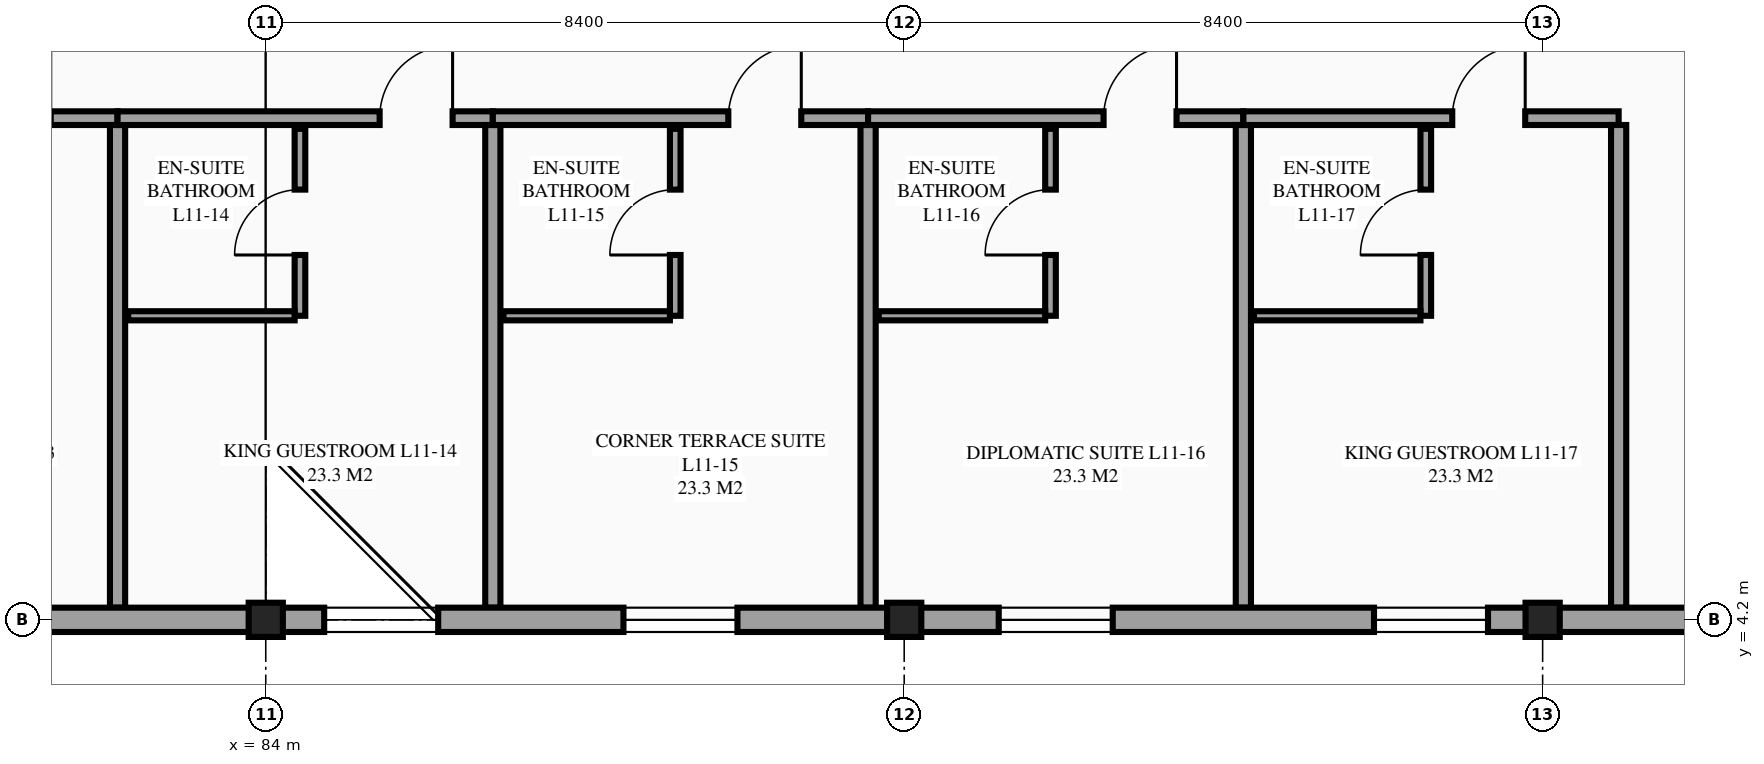
"""IFC4 building model, lengths in metres.
Left out: names, types, materials, properties, quantities, classifications, styles, units other than length and angle.
Written with IfcOpenShell. Run it as: python <this file> out.ifc"""

import sys

from ifc_helpers import new_model, si_unit, direction, frame, frame_2d, origin, origin_2d, place, context, subcontext, project, spatial, rectangle, extrude, element, fill, save


model = new_model("IFC4")
c1 = context("Model", 3, precision=1e-05, world=origin(), true_north=direction((0.0, 1.0)))
c2 = subcontext(c1, "Body", "Model", "MODEL_VIEW")
j1 = project(units=[si_unit("LENGTHUNIT", "METRE"), si_unit("PLANEANGLEUNIT", "RADIAN")], contexts=[c1])
p1 = place(None, origin())
s1 = spatial("IfcSite", under=j1, at=p1, CompositionType="ELEMENT")
p2 = place(p1, origin())
s2 = spatial("IfcBuilding", under=s1, at=p2, CompositionType="ELEMENT")
p3 = place(p2, frame((0.0, 0.0, 43.5)))
s3 = spatial("IfcBuildingStorey", under=s2, at=p3, CompositionType="ELEMENT", Elevation=43.5)
for number, where, z_axis, x_axis in (
    (1, (84.0, 4.2, 0.0), (0.0, 0.0, 1.0), (1.0, 0.0, 0.0)),
    (2, (92.4, 4.2, 0.0), (0.0, 0.0, 1.0), (1.0, 0.0, 0.0)),
    (3, (100.8, 4.2, 0.0), (0.0, 0.0, 1.0), (1.0, 0.0, 0.0)),
):
    element("IfcColumn", number, at=place(p3, frame(where, z_axis=z_axis, x_axis=x_axis)), inside=s3, PredefinedType="COLUMN", context=c2, shape_type="SweptSolid", body=[
        extrude(rectangle(XDim=0.45, YDim=0.45, at=origin_2d()), origin(), (0.0, 0.0, 1.0), 3.6),
    ])
p4 = place(p3, frame((77.113, 10.8, 0.0), z_axis=(0.0, 0.0, 1.0), x_axis=(1.0, 0.0, 0.0)))
e4 = element("IfcWall", 4, at=p4, inside=s3, PredefinedType="PARTITIONING", context=c2, shape_type="SweptSolid", body=[
    extrude(rectangle(XDim=4.938, YDim=0.18, at=frame_2d((2.469, 0.0))), origin(), (0.0, 0.0, 1.0), 3.355),
])
p5 = place(p4, frame((3.098, 0.0, 0.0)))
e5 = element("IfcOpeningElement", 5, at=p5, cuts=e4, PredefinedType="OPENING", context=c2, shape_type="SweptSolid", body=[
    extrude(rectangle(XDim=0.96, YDim=2.15, at=frame_2d((0.48, 1.075))), frame((0.0, 0.1, 0.0), z_axis=(0.0, -1.0, 0.0), x_axis=(1.0, 0.0, 0.0)), (0.0, 0.0, 1.0), 0.2),
])
p6 = place(p3, frame((82.05, 4.36, 0.0), z_axis=(0.0, 0.0, 1.0), x_axis=(0.0, 1.0, 0.0)))
e6 = element("IfcWall", 6, at=p6, inside=s3, PredefinedType="PARTITIONING", context=c2, shape_type="SweptSolid", body=[
    extrude(rectangle(XDim=6.35, YDim=0.2, at=frame_2d((3.175, 0.0))), origin(), (0.0, 0.0, 1.0), 3.355),
])
p7 = place(p3, frame((82.05, 10.8, 0.0), z_axis=(0.0, 0.0, 1.0), x_axis=(1.0, 0.0, 0.0)))
e7 = element("IfcWall", 7, at=p7, inside=s3, PredefinedType="PARTITIONING", context=c2, shape_type="SweptSolid", body=[
    extrude(rectangle(XDim=4.938, YDim=0.18, at=frame_2d((2.469, 0.0))), origin(), (0.0, 0.0, 1.0), 3.355),
])
p8 = place(p7, frame((3.448, 0.0, 0.0)))
e8 = element("IfcOpeningElement", 8, at=p8, cuts=e7, PredefinedType="OPENING", context=c2, shape_type="SweptSolid", body=[
    extrude(rectangle(XDim=0.96, YDim=2.15, at=frame_2d((0.48, 1.075))), frame((0.0, 0.1, 0.0), z_axis=(0.0, -1.0, 0.0), x_axis=(1.0, 0.0, 0.0)), (0.0, 0.0, 1.0), 0.2),
])
p9 = place(p3, frame((86.988, 4.36, 0.0), z_axis=(0.0, 0.0, 1.0), x_axis=(0.0, 1.0, 0.0)))
e9 = element("IfcWall", 9, at=p9, inside=s3, PredefinedType="PARTITIONING", context=c2, shape_type="SweptSolid", body=[
    extrude(rectangle(XDim=6.35, YDim=0.2, at=frame_2d((3.175, 0.0))), origin(), (0.0, 0.0, 1.0), 3.355),
])
p10 = place(p3, frame((84.45, 8.2, 0.0), z_axis=(0.0, 0.0, 1.0), x_axis=(0.0, 1.0, 0.0)))
e10 = element("IfcWall", 10, at=p10, inside=s3, PredefinedType="PARTITIONING", context=c2, shape_type="SweptSolid", body=[
    extrude(rectangle(XDim=2.46, YDim=0.14, at=frame_2d((1.23, 0.0))), origin(), (0.0, 0.0, 1.0), 3.355),
])
p11 = place(p10, frame((0.8, 0.0, 0.0)))
e11 = element("IfcOpeningElement", 11, at=p11, cuts=e10, PredefinedType="OPENING", context=c2, shape_type="SweptSolid", body=[
    extrude(rectangle(XDim=0.86, YDim=2.1, at=frame_2d((0.43, 1.05))), frame((0.0, 0.08, 0.0), z_axis=(0.0, -1.0, 0.0), x_axis=(1.0, 0.0, 0.0)), (0.0, 0.0, 1.0), 0.16),
])
p12 = place(p3, frame((82.19, 8.2, 0.0), z_axis=(0.0, 0.0, 1.0), x_axis=(1.0, 0.0, 0.0)))
e12 = element("IfcWall", 12, at=p12, inside=s3, PredefinedType="PARTITIONING", context=c2, shape_type="SweptSolid", body=[
    extrude(rectangle(XDim=2.19, YDim=0.12, at=frame_2d((1.095, 0.0))), origin(), (0.0, 0.0, 1.0), 3.355),
])
p13 = place(p3, frame((86.988, 10.8, 0.0), z_axis=(0.0, 0.0, 1.0), x_axis=(1.0, 0.0, 0.0)))
e13 = element("IfcWall", 13, at=p13, inside=s3, PredefinedType="PARTITIONING", context=c2, shape_type="SweptSolid", body=[
    extrude(rectangle(XDim=4.938, YDim=0.18, at=frame_2d((2.469, 0.0))), origin(), (0.0, 0.0, 1.0), 3.355),
])
p14 = place(p13, frame((3.098, 0.0, 0.0)))
e14 = element("IfcOpeningElement", 14, at=p14, cuts=e13, PredefinedType="OPENING", context=c2, shape_type="SweptSolid", body=[
    extrude(rectangle(XDim=0.96, YDim=2.15, at=frame_2d((0.48, 1.075))), frame((0.0, 0.1, 0.0), z_axis=(0.0, -1.0, 0.0), x_axis=(1.0, 0.0, 0.0)), (0.0, 0.0, 1.0), 0.2),
])
p15 = place(p3, frame((91.925, 4.36, 0.0), z_axis=(0.0, 0.0, 1.0), x_axis=(0.0, 1.0, 0.0)))
e15 = element("IfcWall", 15, at=p15, inside=s3, PredefinedType="PARTITIONING", context=c2, shape_type="SweptSolid", body=[
    extrude(rectangle(XDim=6.35, YDim=0.2, at=frame_2d((3.175, 0.0))), origin(), (0.0, 0.0, 1.0), 3.355),
])
p16 = place(p3, frame((89.387, 8.2, 0.0), z_axis=(0.0, 0.0, 1.0), x_axis=(0.0, 1.0, 0.0)))
e16 = element("IfcWall", 16, at=p16, inside=s3, PredefinedType="PARTITIONING", context=c2, shape_type="SweptSolid", body=[
    extrude(rectangle(XDim=2.46, YDim=0.14, at=frame_2d((1.23, 0.0))), origin(), (0.0, 0.0, 1.0), 3.355),
])
p17 = place(p16, frame((0.8, 0.0, 0.0)))
e17 = element("IfcOpeningElement", 17, at=p17, cuts=e16, PredefinedType="OPENING", context=c2, shape_type="SweptSolid", body=[
    extrude(rectangle(XDim=0.86, YDim=2.1, at=frame_2d((0.43, 1.05))), frame((0.0, 0.08, 0.0), z_axis=(0.0, -1.0, 0.0), x_axis=(1.0, 0.0, 0.0)), (0.0, 0.0, 1.0), 0.16),
])
p18 = place(p3, frame((87.127, 8.2, 0.0), z_axis=(0.0, 0.0, 1.0), x_axis=(1.0, 0.0, 0.0)))
e18 = element("IfcWall", 18, at=p18, inside=s3, PredefinedType="PARTITIONING", context=c2, shape_type="SweptSolid", body=[
    extrude(rectangle(XDim=2.19, YDim=0.12, at=frame_2d((1.095, 0.0))), origin(), (0.0, 0.0, 1.0), 3.355),
])
p19 = place(p3, frame((91.925, 10.8, 0.0), z_axis=(0.0, 0.0, 1.0), x_axis=(1.0, 0.0, 0.0)))
e19 = element("IfcWall", 19, at=p19, inside=s3, PredefinedType="PARTITIONING", context=c2, shape_type="SweptSolid", body=[
    extrude(rectangle(XDim=4.938, YDim=0.18, at=frame_2d((2.469, 0.0))), origin(), (0.0, 0.0, 1.0), 3.355),
])
p20 = place(p19, frame((3.098, 0.0, 0.0)))
e20 = element("IfcOpeningElement", 20, at=p20, cuts=e19, PredefinedType="OPENING", context=c2, shape_type="SweptSolid", body=[
    extrude(rectangle(XDim=0.96, YDim=2.15, at=frame_2d((0.48, 1.075))), frame((0.0, 0.1, 0.0), z_axis=(0.0, -1.0, 0.0), x_axis=(1.0, 0.0, 0.0)), (0.0, 0.0, 1.0), 0.2),
])
p21 = place(p3, frame((96.863, 4.36, 0.0), z_axis=(0.0, 0.0, 1.0), x_axis=(0.0, 1.0, 0.0)))
e21 = element("IfcWall", 21, at=p21, inside=s3, PredefinedType="PARTITIONING", context=c2, shape_type="SweptSolid", body=[
    extrude(rectangle(XDim=6.35, YDim=0.2, at=frame_2d((3.175, 0.0))), origin(), (0.0, 0.0, 1.0), 3.355),
])
p22 = place(p3, frame((94.325, 8.2, 0.0), z_axis=(0.0, 0.0, 1.0), x_axis=(0.0, 1.0, 0.0)))
e22 = element("IfcWall", 22, at=p22, inside=s3, PredefinedType="PARTITIONING", context=c2, shape_type="SweptSolid", body=[
    extrude(rectangle(XDim=2.46, YDim=0.14, at=frame_2d((1.23, 0.0))), origin(), (0.0, 0.0, 1.0), 3.355),
])
p23 = place(p22, frame((0.8, 0.0, 0.0)))
e23 = element("IfcOpeningElement", 23, at=p23, cuts=e22, PredefinedType="OPENING", context=c2, shape_type="SweptSolid", body=[
    extrude(rectangle(XDim=0.86, YDim=2.1, at=frame_2d((0.43, 1.05))), frame((0.0, 0.08, 0.0), z_axis=(0.0, -1.0, 0.0), x_axis=(1.0, 0.0, 0.0)), (0.0, 0.0, 1.0), 0.16),
])
p24 = place(p3, frame((92.065, 8.2, 0.0), z_axis=(0.0, 0.0, 1.0), x_axis=(1.0, 0.0, 0.0)))
e24 = element("IfcWall", 24, at=p24, inside=s3, PredefinedType="PARTITIONING", context=c2, shape_type="SweptSolid", body=[
    extrude(rectangle(XDim=2.19, YDim=0.12, at=frame_2d((1.095, 0.0))), origin(), (0.0, 0.0, 1.0), 3.355),
])
p25 = place(p3, frame((96.863, 10.8, 0.0), z_axis=(0.0, 0.0, 1.0), x_axis=(1.0, 0.0, 0.0)))
e25 = element("IfcWall", 25, at=p25, inside=s3, PredefinedType="PARTITIONING", context=c2, shape_type="SweptSolid", body=[
    extrude(rectangle(XDim=4.938, YDim=0.18, at=frame_2d((2.469, 0.0))), origin(), (0.0, 0.0, 1.0), 3.355),
])
p26 = place(p25, frame((2.748, 0.0, 0.0)))
e26 = element("IfcOpeningElement", 26, at=p26, cuts=e25, PredefinedType="OPENING", context=c2, shape_type="SweptSolid", body=[
    extrude(rectangle(XDim=0.96, YDim=2.15, at=frame_2d((0.48, 1.075))), frame((0.0, 0.1, 0.0), z_axis=(0.0, -1.0, 0.0), x_axis=(1.0, 0.0, 0.0)), (0.0, 0.0, 1.0), 0.2),
])
p27 = place(p3, frame((101.8, 4.36, 0.0), z_axis=(0.0, 0.0, 1.0), x_axis=(0.0, 1.0, 0.0)))
e27 = element("IfcWall", 27, at=p27, inside=s3, PredefinedType="PARTITIONING", context=c2, shape_type="SweptSolid", body=[
    extrude(rectangle(XDim=6.35, YDim=0.2, at=frame_2d((3.175, 0.0))), origin(), (0.0, 0.0, 1.0), 3.355),
])
p28 = place(p3, frame((99.262, 8.2, 0.0), z_axis=(0.0, 0.0, 1.0), x_axis=(0.0, 1.0, 0.0)))
e28 = element("IfcWall", 28, at=p28, inside=s3, PredefinedType="PARTITIONING", context=c2, shape_type="SweptSolid", body=[
    extrude(rectangle(XDim=2.46, YDim=0.14, at=frame_2d((1.23, 0.0))), origin(), (0.0, 0.0, 1.0), 3.355),
])
p29 = place(p28, frame((0.8, 0.0, 0.0)))
e29 = element("IfcOpeningElement", 29, at=p29, cuts=e28, PredefinedType="OPENING", context=c2, shape_type="SweptSolid", body=[
    extrude(rectangle(XDim=0.86, YDim=2.1, at=frame_2d((0.43, 1.05))), frame((0.0, 0.08, 0.0), z_axis=(0.0, -1.0, 0.0), x_axis=(1.0, 0.0, 0.0)), (0.0, 0.0, 1.0), 0.16),
])
p30 = place(p3, frame((97.002, 8.2, 0.0), z_axis=(0.0, 0.0, 1.0), x_axis=(1.0, 0.0, 0.0)))
e30 = element("IfcWall", 30, at=p30, inside=s3, PredefinedType="PARTITIONING", context=c2, shape_type="SweptSolid", body=[
    extrude(rectangle(XDim=2.19, YDim=0.12, at=frame_2d((1.095, 0.0))), origin(), (0.0, 0.0, 1.0), 3.355),
])
p31 = place(p3, frame((67.2, 4.2, 0.0), z_axis=(0.0, 0.0, 1.0), x_axis=(1.0, 0.0, 0.0)))
e31 = element("IfcWall", 31, at=p31, inside=s3, PredefinedType="STANDARD", context=c2, shape_type="SweptSolid", body=[
    extrude(rectangle(XDim=16.8, YDim=0.32, at=frame_2d((8.4, 0.0))), origin(), (0.0, 0.0, 1.0), 2.61),
])
p32 = place(p31, frame((1.756, 0.0, 0.85)))
e32 = element("IfcOpeningElement", 32, at=p32, cuts=e31, PredefinedType="OPENING", context=c2, shape_type="SweptSolid", body=[
    extrude(rectangle(XDim=1.5, YDim=1.5, at=frame_2d((0.75, 0.75))), frame((0.0, 0.17, 0.0), z_axis=(0.0, -1.0, 0.0), x_axis=(1.0, 0.0, 0.0)), (0.0, 0.0, 1.0), 0.34),
])
p33 = place(p31, frame((6.194, 0.0, 0.85)))
e33 = element("IfcOpeningElement", 33, at=p33, cuts=e31, PredefinedType="OPENING", context=c2, shape_type="SweptSolid", body=[
    extrude(rectangle(XDim=1.5, YDim=1.5, at=frame_2d((0.75, 0.75))), frame((0.0, 0.17, 0.0), z_axis=(0.0, -1.0, 0.0), x_axis=(1.0, 0.0, 0.0)), (0.0, 0.0, 1.0), 0.34),
])
p34 = place(p31, frame((11.631, 0.0, 0.85)))
e34 = element("IfcOpeningElement", 34, at=p34, cuts=e31, PredefinedType="OPENING", context=c2, shape_type="SweptSolid", body=[
    extrude(rectangle(XDim=1.5, YDim=1.5, at=frame_2d((0.75, 0.75))), frame((0.0, 0.17, 0.0), z_axis=(0.0, -1.0, 0.0), x_axis=(1.0, 0.0, 0.0)), (0.0, 0.0, 1.0), 0.34),
])
p35 = place(p3, frame((84.0, 4.2, 0.0), z_axis=(0.0, 0.0, 1.0), x_axis=(1.0, 0.0, 0.0)))
e35 = element("IfcWall", 35, at=p35, inside=s3, PredefinedType="STANDARD", context=c2, shape_type="SweptSolid", body=[
    extrude(rectangle(XDim=8.4, YDim=0.32, at=frame_2d((4.2, 0.0))), origin(), (0.0, 0.0, 1.0), 3.055),
])
p36 = place(p35, frame((0.769, 0.0, 0.85)))
e36 = element("IfcOpeningElement", 36, at=p36, cuts=e35, PredefinedType="OPENING", context=c2, shape_type="SweptSolid", body=[
    extrude(rectangle(XDim=1.5, YDim=1.5, at=frame_2d((0.75, 0.75))), frame((0.0, 0.17, 0.0), z_axis=(0.0, -1.0, 0.0), x_axis=(1.0, 0.0, 0.0)), (0.0, 0.0, 1.0), 0.34),
])
p37 = place(p35, frame((4.706, 0.0, 0.85)))
e37 = element("IfcOpeningElement", 37, at=p37, cuts=e35, PredefinedType="OPENING", context=c2, shape_type="SweptSolid", body=[
    extrude(rectangle(XDim=1.5, YDim=1.5, at=frame_2d((0.75, 0.75))), frame((0.0, 0.17, 0.0), z_axis=(0.0, -1.0, 0.0), x_axis=(1.0, 0.0, 0.0)), (0.0, 0.0, 1.0), 0.34),
])
p38 = place(p3, frame((92.4, 4.2, 0.0), z_axis=(0.0, 0.0, 1.0), x_axis=(1.0, 0.0, 0.0)))
e38 = element("IfcWall", 38, at=p38, inside=s3, PredefinedType="STANDARD", context=c2, shape_type="SweptSolid", body=[
    extrude(rectangle(XDim=8.4, YDim=0.32, at=frame_2d((4.2, 0.0))), origin(), (0.0, 0.0, 1.0), 2.76),
])
p39 = place(p38, frame((1.244, 0.0, 0.85)))
e39 = element("IfcOpeningElement", 39, at=p39, cuts=e38, PredefinedType="OPENING", context=c2, shape_type="SweptSolid", body=[
    extrude(rectangle(XDim=1.5, YDim=1.5, at=frame_2d((0.75, 0.75))), frame((0.0, 0.17, 0.0), z_axis=(0.0, -1.0, 0.0), x_axis=(1.0, 0.0, 0.0)), (0.0, 0.0, 1.0), 0.34),
])
p40 = place(p38, frame((6.181, 0.0, 0.85)))
e40 = element("IfcOpeningElement", 40, at=p40, cuts=e38, PredefinedType="OPENING", context=c2, shape_type="SweptSolid", body=[
    extrude(rectangle(XDim=1.5, YDim=1.5, at=frame_2d((0.75, 0.75))), frame((0.0, 0.17, 0.0), z_axis=(0.0, -1.0, 0.0), x_axis=(1.0, 0.0, 0.0)), (0.0, 0.0, 1.0), 0.34),
])
p41 = place(p3, frame((100.8, 4.2, 0.0), z_axis=(0.0, 0.0, 1.0), x_axis=(1.0, 0.0, 0.0)))
e41 = element("IfcWall", 41, at=p41, inside=s3, PredefinedType="STANDARD", context=c2, shape_type="SweptSolid", body=[
    extrude(rectangle(XDim=8.4, YDim=0.32, at=frame_2d((4.2, 0.0))), origin(), (0.0, 0.0, 1.0), 2.41),
])
p42 = place(p36, origin())
e42 = element("IfcWindow", 42, at=p42, inside=s3, PartitioningType="SINGLE_PANEL", PredefinedType="WINDOW", context=c2, shape_type="SweptSolid", body=[
    extrude(rectangle(XDim=1.5, YDim=1.5, at=frame_2d((0.75, 0.75))), frame((0.0, 0.03, 0.0), z_axis=(0.0, -1.0, 0.0), x_axis=(1.0, 0.0, 0.0)), (0.0, 0.0, 1.0), 0.06),
])
fill(e36, e42)
p43 = place(p37, origin())
e43 = element("IfcWindow", 43, at=p43, inside=s3, PartitioningType="SINGLE_PANEL", PredefinedType="WINDOW", context=c2, shape_type="SweptSolid", body=[
    extrude(rectangle(XDim=1.5, YDim=1.5, at=frame_2d((0.75, 0.75))), frame((0.0, 0.03, 0.0), z_axis=(0.0, -1.0, 0.0), x_axis=(1.0, 0.0, 0.0)), (0.0, 0.0, 1.0), 0.06),
])
fill(e37, e43)
p44 = place(p39, origin())
e44 = element("IfcWindow", 44, at=p44, inside=s3, PartitioningType="SINGLE_PANEL", PredefinedType="WINDOW", context=c2, shape_type="SweptSolid", body=[
    extrude(rectangle(XDim=1.5, YDim=1.5, at=frame_2d((0.75, 0.75))), frame((0.0, 0.03, 0.0), z_axis=(0.0, -1.0, 0.0), x_axis=(1.0, 0.0, 0.0)), (0.0, 0.0, 1.0), 0.06),
])
fill(e39, e44)
p45 = place(p40, origin())
e45 = element("IfcWindow", 45, at=p45, inside=s3, PartitioningType="SINGLE_PANEL", PredefinedType="WINDOW", context=c2, shape_type="SweptSolid", body=[
    extrude(rectangle(XDim=1.5, YDim=1.5, at=frame_2d((0.75, 0.75))), frame((0.0, 0.03, 0.0), z_axis=(0.0, -1.0, 0.0), x_axis=(1.0, 0.0, 0.0)), (0.0, 0.0, 1.0), 0.06),
])
fill(e40, e45)
p46 = place(p8, origin())
e46 = element("IfcDoor", 46, at=p46, inside=s3, OperationType="SINGLE_SWING_RIGHT", PredefinedType="DOOR", context=c2, shape_type="SweptSolid", body=[
    extrude(rectangle(XDim=0.96, YDim=2.15, at=frame_2d((0.48, 1.075))), frame((0.0, 0.025, 0.0), z_axis=(0.0, -1.0, 0.0), x_axis=(1.0, 0.0, 0.0)), (0.0, 0.0, 1.0), 0.05),
])
fill(e8, e46)
p47 = place(p11, origin())
e47 = element("IfcDoor", 47, at=p47, inside=s3, OperationType="SINGLE_SWING_LEFT", PredefinedType="DOOR", context=c2, shape_type="SweptSolid", body=[
    extrude(rectangle(XDim=0.86, YDim=2.1, at=frame_2d((0.43, 1.05))), frame((0.0, 0.025, 0.0), z_axis=(0.0, -1.0, 0.0), x_axis=(1.0, 0.0, 0.0)), (0.0, 0.0, 1.0), 0.05),
])
fill(e11, e47)
p48 = place(p14, origin())
e48 = element("IfcDoor", 48, at=p48, inside=s3, OperationType="SINGLE_SWING_RIGHT", PredefinedType="DOOR", context=c2, shape_type="SweptSolid", body=[
    extrude(rectangle(XDim=0.96, YDim=2.15, at=frame_2d((0.48, 1.075))), frame((0.0, 0.025, 0.0), z_axis=(0.0, -1.0, 0.0), x_axis=(1.0, 0.0, 0.0)), (0.0, 0.0, 1.0), 0.05),
])
fill(e14, e48)
p49 = place(p17, origin())
e49 = element("IfcDoor", 49, at=p49, inside=s3, OperationType="SINGLE_SWING_LEFT", PredefinedType="DOOR", context=c2, shape_type="SweptSolid", body=[
    extrude(rectangle(XDim=0.86, YDim=2.1, at=frame_2d((0.43, 1.05))), frame((0.0, 0.025, 0.0), z_axis=(0.0, -1.0, 0.0), x_axis=(1.0, 0.0, 0.0)), (0.0, 0.0, 1.0), 0.05),
])
fill(e17, e49)
p50 = place(p20, origin())
e50 = element("IfcDoor", 50, at=p50, inside=s3, OperationType="SINGLE_SWING_RIGHT", PredefinedType="DOOR", context=c2, shape_type="SweptSolid", body=[
    extrude(rectangle(XDim=0.96, YDim=2.15, at=frame_2d((0.48, 1.075))), frame((0.0, 0.025, 0.0), z_axis=(0.0, -1.0, 0.0), x_axis=(1.0, 0.0, 0.0)), (0.0, 0.0, 1.0), 0.05),
])
fill(e20, e50)
p51 = place(p23, origin())
e51 = element("IfcDoor", 51, at=p51, inside=s3, OperationType="SINGLE_SWING_LEFT", PredefinedType="DOOR", context=c2, shape_type="SweptSolid", body=[
    extrude(rectangle(XDim=0.86, YDim=2.1, at=frame_2d((0.43, 1.05))), frame((0.0, 0.025, 0.0), z_axis=(0.0, -1.0, 0.0), x_axis=(1.0, 0.0, 0.0)), (0.0, 0.0, 1.0), 0.05),
])
fill(e23, e51)
p52 = place(p26, origin())
e52 = element("IfcDoor", 52, at=p52, inside=s3, OperationType="SINGLE_SWING_RIGHT", PredefinedType="DOOR", context=c2, shape_type="SweptSolid", body=[
    extrude(rectangle(XDim=0.96, YDim=2.15, at=frame_2d((0.48, 1.075))), frame((0.0, 0.025, 0.0), z_axis=(0.0, -1.0, 0.0), x_axis=(1.0, 0.0, 0.0)), (0.0, 0.0, 1.0), 0.05),
])
fill(e26, e52)
p53 = place(p29, origin())
e53 = element("IfcDoor", 53, at=p53, inside=s3, OperationType="SINGLE_SWING_LEFT", PredefinedType="DOOR", context=c2, shape_type="SweptSolid", body=[
    extrude(rectangle(XDim=0.86, YDim=2.1, at=frame_2d((0.43, 1.05))), frame((0.0, 0.025, 0.0), z_axis=(0.0, -1.0, 0.0), x_axis=(1.0, 0.0, 0.0)), (0.0, 0.0, 1.0), 0.05),
])
fill(e29, e53)
save(model, sys.argv[1])
